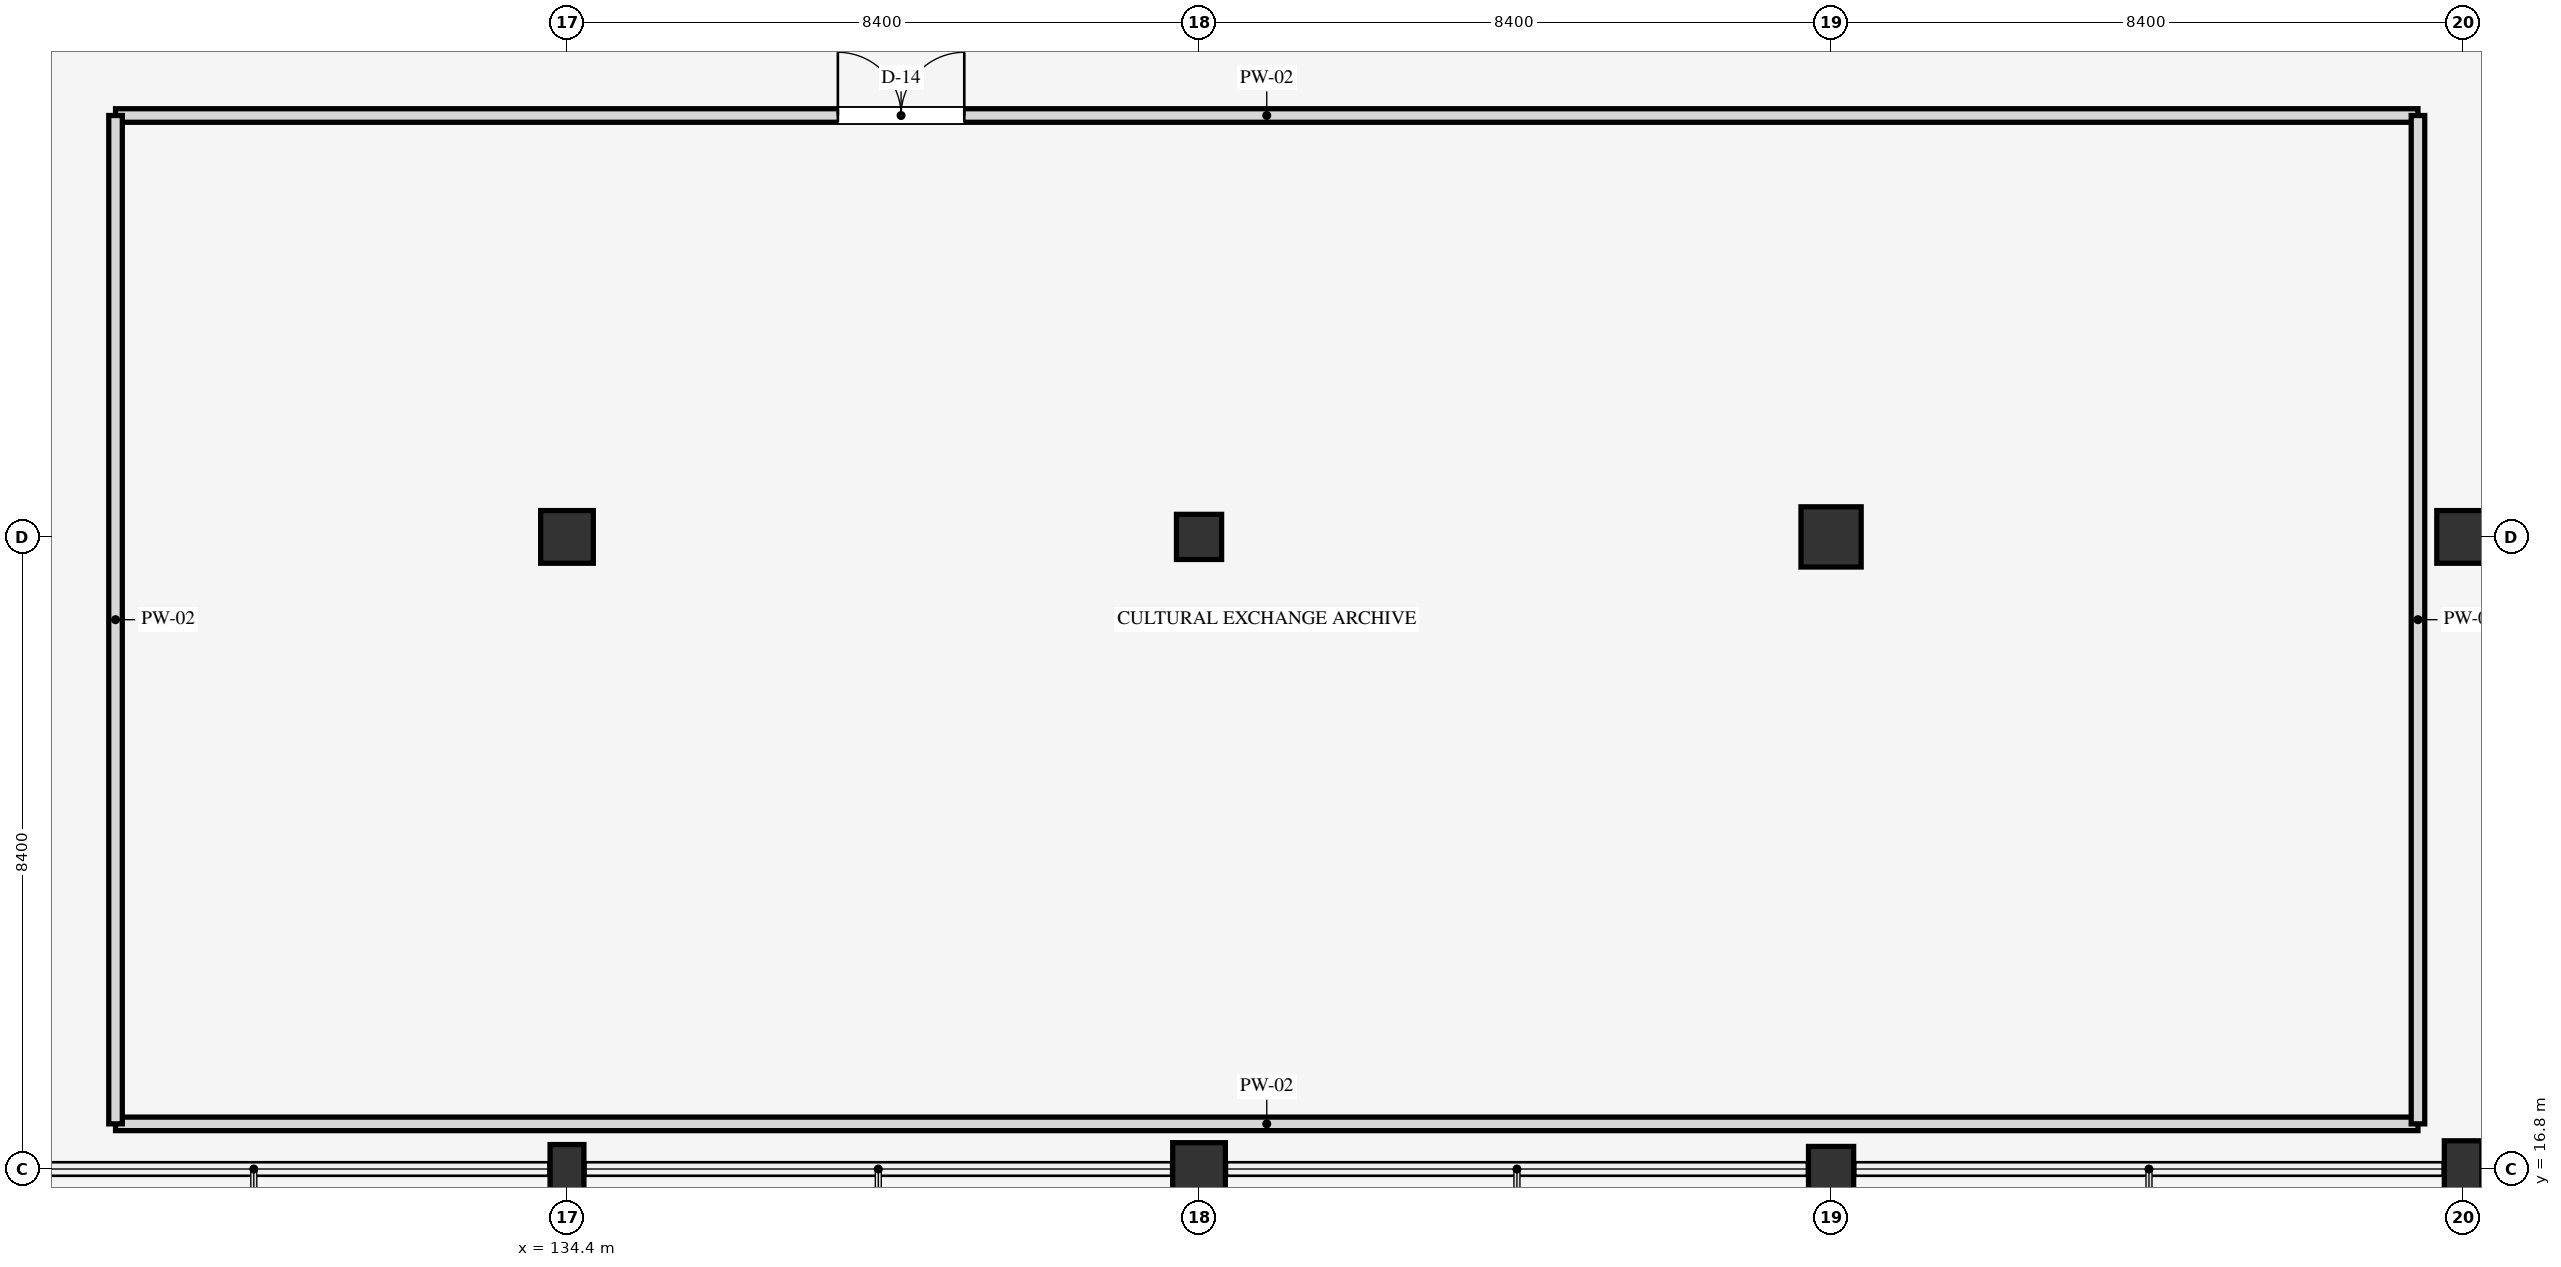
"""IFC4 building model, lengths in metres.
Left out: names, types, materials, properties, quantities, classifications, styles, units other than length and angle.
Written with IfcOpenShell. Run it as: python <this file> out.ifc"""

import sys

from ifc_helpers import new_model, si_unit, direction, frame, frame_2d, origin, origin_2d, place, context, subcontext, project, spatial, rectangle, extrude, element, fill, save


model = new_model("IFC4")
c1 = context("Model", 3, precision=1e-05, world=origin(), true_north=direction((0.0, 1.0)))
c2 = subcontext(c1, "Body", "Model", "MODEL_VIEW")
j1 = project(units=[si_unit("LENGTHUNIT", "METRE"), si_unit("PLANEANGLEUNIT", "RADIAN")], contexts=[c1])
p1 = place(None, origin())
s1 = spatial("IfcSite", under=j1, at=p1, CompositionType="ELEMENT")
p2 = place(p1, origin())
s2 = spatial("IfcBuilding", under=s1, at=p2, CompositionType="ELEMENT")
p3 = place(p2, frame((0.0, 0.0, 9.9)))
s3 = spatial("IfcBuildingStorey", under=s2, at=p3, CompositionType="ELEMENT", Elevation=9.9)
p4 = place(p3, frame((134.4, 16.8, 0.0), z_axis=(0.0, 0.0, 1.0), x_axis=(1.0, 0.0, 0.0)))
e1 = element("IfcColumn", 1, at=p4, inside=s3, PredefinedType="PILASTER", context=c2, shape_type="SweptSolid", body=[
    extrude(rectangle(XDim=0.45, YDim=0.65, at=origin_2d()), origin(), (0.0, 0.0, 1.0), 4.5),
])
for number, where, z_axis, x_axis in (
    (2, (134.4, 25.2, 0.0), (0.0, 0.0, 1.0), (1.0, 0.0, 0.0)),
    (3, (142.8, 16.8, 0.0), (0.0, 0.0, 1.0), (1.0, 0.0, 0.0)),
):
    element("IfcColumn", number, at=place(p3, frame(where, z_axis=z_axis, x_axis=x_axis)), inside=s3, PredefinedType="COLUMN", context=c2, shape_type="SweptSolid", body=[
        extrude(rectangle(XDim=0.7, YDim=0.7, at=origin_2d()), origin(), (0.0, 0.0, 1.0), 4.5),
    ])
for number, where, z_axis, x_axis in (
    (4, (142.8, 25.2, 0.0), (0.0, 0.0, 1.0), (1.0, 0.0, 0.0)),
    (5, (151.2, 16.8, 0.0), (0.0, 0.0, 1.0), (1.0, 0.0, 0.0)),
):
    element("IfcColumn", number, at=place(p3, frame(where, z_axis=z_axis, x_axis=x_axis)), inside=s3, PredefinedType="COLUMN", context=c2, shape_type="SweptSolid", body=[
        extrude(rectangle(XDim=0.6, YDim=0.6, at=origin_2d()), origin(), (0.0, 0.0, 1.0), 4.5),
    ])
p5 = place(p3, frame((151.2, 25.2, 0.0), z_axis=(0.0, 0.0, 1.0), x_axis=(1.0, 0.0, 0.0)))
e6 = element("IfcColumn", 6, at=p5, inside=s3, PredefinedType="COLUMN", context=c2, shape_type="SweptSolid", body=[
    extrude(rectangle(XDim=0.8, YDim=0.8, at=origin_2d()), origin(), (0.0, 0.0, 1.0), 4.5),
])
p6 = place(p3, frame((159.6, 16.8, 0.0), z_axis=(0.0, 0.0, 1.0), x_axis=(1.0, 0.0, 0.0)))
e7 = element("IfcColumn", 7, at=p6, inside=s3, PredefinedType="PILASTER", context=c2, shape_type="SweptSolid", body=[
    extrude(rectangle(XDim=0.5, YDim=0.75, at=origin_2d()), origin(), (0.0, 0.0, 1.0), 4.5),
])
p7 = place(p3, frame((159.6, 25.2, 0.0), z_axis=(0.0, 0.0, 1.0), x_axis=(1.0, 0.0, 0.0)))
e8 = element("IfcColumn", 8, at=p7, inside=s3, PredefinedType="COLUMN", context=c2, shape_type="SweptSolid", body=[
    extrude(rectangle(XDim=0.7, YDim=0.7, at=origin_2d()), origin(), (0.0, 0.0, 1.0), 4.5),
])
p8 = place(p3, frame((128.4, 17.4, 0.0), z_axis=(0.0, 0.0, 1.0), x_axis=(1.0, 0.0, 0.0)))
e9 = element("IfcWall", 9, at=p8, inside=s3, PredefinedType="PARTITIONING", context=c2, shape_type="SweptSolid", body=[
    extrude(rectangle(XDim=30.6, YDim=0.18, at=frame_2d((15.3, 0.0))), origin(), (0.0, 0.0, 1.0), 3.54),
])
p9 = place(p3, frame((128.4, 30.8, 0.0), z_axis=(0.0, 0.0, 1.0), x_axis=(1.0, 0.0, 0.0)))
e10 = element("IfcWall", 10, at=p9, inside=s3, PredefinedType="PARTITIONING", context=c2, shape_type="SweptSolid", body=[
    extrude(rectangle(XDim=30.6, YDim=0.18, at=frame_2d((15.3, 0.0))), origin(), (0.0, 0.0, 1.0), 3.54),
])
p10 = place(p9, frame((9.6, 0.0, 0.0)))
e11 = element("IfcOpeningElement", 11, at=p10, cuts=e10, PredefinedType="OPENING", context=c2, shape_type="SweptSolid", body=[
    extrude(rectangle(XDim=1.68, YDim=2.24, at=frame_2d((0.84, 1.12))), frame((0.0, 0.1, 0.0), z_axis=(0.0, -1.0, 0.0), x_axis=(1.0, 0.0, 0.0)), (0.0, 0.0, 1.0), 0.2),
])
for number, where, z_axis, x_axis in (
    (12, (128.4, 17.4, 0.0), (0.0, 0.0, 1.0), (0.0, 1.0, 0.0)),
    (13, (159.0, 17.4, 0.0), (0.0, 0.0, 1.0), (0.0, 1.0, 0.0)),
):
    element("IfcWall", number, at=place(p3, frame(where, z_axis=z_axis, x_axis=x_axis)), inside=s3, PredefinedType="PARTITIONING", context=c2, shape_type="SweptSolid", body=[
        extrude(rectangle(XDim=13.4, YDim=0.18, at=frame_2d((6.7, 0.0))), origin(), (0.0, 0.0, 1.0), 3.54),
    ])
p11 = place(p10, origin())
e14 = element("IfcDoor", 14, at=p11, inside=s3, OperationType="DOUBLE_DOOR_SINGLE_SWING", PredefinedType="DOOR", context=c2, shape_type="SweptSolid", body=[
    extrude(rectangle(XDim=1.68, YDim=2.24, at=frame_2d((0.84, 1.12))), frame((0.0, 0.025, 0.0), z_axis=(0.0, -1.0, 0.0), x_axis=(1.0, 0.0, 0.0)), (0.0, 0.0, 1.0), 0.05),
])
fill(e11, e14)
save(model, sys.argv[1])
